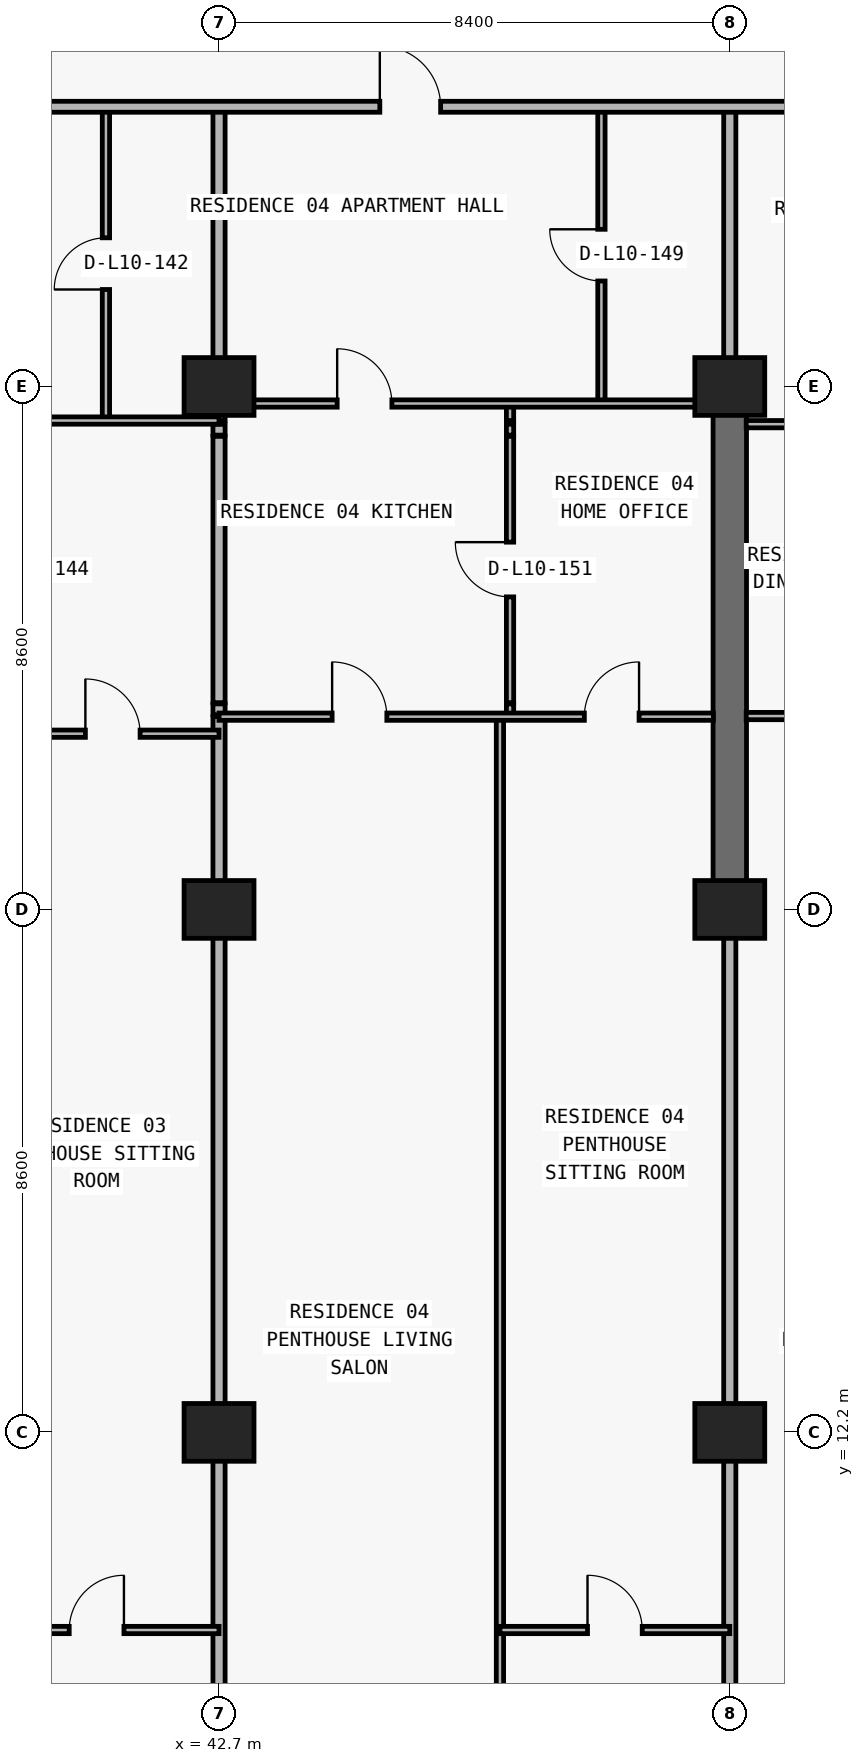
"""IFC4 building model, lengths in metres.
Left out: names, types, materials, properties, quantities, classifications, styles, units other than length and angle.
Written with IfcOpenShell. Run it as: python <this file> out.ifc"""

import sys

from ifc_helpers import new_model, si_unit, direction, frame, frame_2d, origin, origin_2d, place, context, subcontext, project, spatial, rectangle, extrude, element, fill, save


model = new_model("IFC4")
c1 = context("Model", 3, precision=1e-05, world=origin(), true_north=direction((0.0, 1.0)))
c2 = subcontext(c1, "Body", "Model", "MODEL_VIEW")
j1 = project(units=[si_unit("LENGTHUNIT", "METRE"), si_unit("PLANEANGLEUNIT", "RADIAN")], contexts=[c1])
p1 = place(None, origin())
s1 = spatial("IfcSite", under=j1, at=p1, CompositionType="ELEMENT")
p2 = place(p1, origin())
s2 = spatial("IfcBuilding", under=s1, at=p2, CompositionType="ELEMENT")
p3 = place(p2, frame((0.0, 0.0, 43.2)))
s3 = spatial("IfcBuildingStorey", under=s2, at=p3, CompositionType="ELEMENT", Elevation=43.2)
for number, where, z_axis, x_axis in (
    (1, (42.7, 12.2, 0.0), (0.0, 0.0, 1.0), (1.0, 0.0, 0.0)),
    (2, (51.1, 12.2, 0.0), (0.0, 0.0, 1.0), (1.0, 0.0, 0.0)),
    (3, (42.7, 20.8, 0.0), (0.0, 0.0, 1.0), (1.0, 0.0, 0.0)),
    (4, (51.1, 20.8, 0.0), (0.0, 0.0, 1.0), (1.0, 0.0, 0.0)),
    (5, (42.7, 29.4, 0.0), (0.0, 0.0, 1.0), (1.0, 0.0, 0.0)),
    (6, (51.1, 29.4, 0.0), (0.0, 0.0, 1.0), (1.0, 0.0, 0.0)),
):
    element("IfcColumn", number, at=place(p3, frame(where, z_axis=z_axis, x_axis=x_axis)), inside=s3, PredefinedType="COLUMN", context=c2, shape_type="SweptSolid", body=[
        extrude(rectangle(XDim=1.15, YDim=0.95, at=origin_2d()), origin(), (0.0, 0.0, 1.0), 3.05),
    ])
p4 = place(p3, frame((51.1, 20.8, 0.0), z_axis=(0.0, 0.0, 1.0), x_axis=(0.0, 1.0, 0.0)))
e7 = element("IfcWall", 7, at=p4, inside=s3, PredefinedType="SHEAR", context=c2, shape_type="SweptSolid", body=[
    extrude(rectangle(XDim=8.6, YDim=0.55, at=frame_2d((4.3, 0.0))), origin(), (0.0, 0.0, 1.0), 3.05),
])
p5 = place(p3, frame((40.84, 28.84, 0.0), z_axis=(0.0, 0.0, 1.0), x_axis=(0.0, 1.0, 0.0)))
e8 = element("IfcWall", 8, at=p5, inside=s3, PredefinedType="PARTITIONING", context=c2, shape_type="SweptSolid", body=[
    extrude(rectangle(XDim=5.16, YDim=0.12, at=frame_2d((2.58, 0.0))), origin(), (0.0, 0.0, 1.0), 3.05),
])
p6 = place(p5, frame((2.155, 0.0, 0.0)))
e9 = element("IfcOpeningElement", 9, at=p6, cuts=e8, PredefinedType="OPENING", context=c2, shape_type="SweptSolid", body=[
    extrude(rectangle(XDim=0.85, YDim=2.1, at=frame_2d((0.425, 1.05))), frame((0.0, 0.07, 0.0), z_axis=(0.0, -1.0, 0.0), x_axis=(1.0, 0.0, 0.0)), (0.0, 0.0, 1.0), 0.14),
])
p7 = place(p3, frame((42.7, 6.24, 0.0), z_axis=(0.0, 0.0, 1.0), x_axis=(0.0, 1.0, 0.0)))
e10 = element("IfcWall", 10, at=p7, inside=s3, PredefinedType="PARTITIONING", context=c2, shape_type="SweptSolid", body=[
    extrude(rectangle(XDim=17.73, YDim=0.2, at=frame_2d((8.865, 0.0))), origin(), (0.0, 0.0, 1.0), 2.11),
])
p8 = place(p3, frame((42.7, 24.0, 0.0), z_axis=(0.0, 0.0, 1.0), x_axis=(0.0, 1.0, 0.0)))
e11 = element("IfcWall", 11, at=p8, inside=s3, PredefinedType="PARTITIONING", context=c2, shape_type="SweptSolid", body=[
    extrude(rectangle(XDim=0.18, YDim=0.2, at=frame_2d((0.09, 0.0))), origin(), (0.0, 0.0, 1.0), 2.11),
])
p9 = place(p3, frame((42.7, 24.2, 0.0), z_axis=(0.0, 0.0, 1.0), x_axis=(0.0, 1.0, 0.0)))
e12 = element("IfcWall", 12, at=p9, inside=s3, PredefinedType="PARTITIONING", context=c2, shape_type="SweptSolid", body=[
    extrude(rectangle(XDim=4.38, YDim=0.2, at=frame_2d((2.19, 0.0))), origin(), (0.0, 0.0, 1.0), 2.11),
])
p10 = place(p3, frame((42.7, 28.6, 0.0), z_axis=(0.0, 0.0, 1.0), x_axis=(0.0, 1.0, 0.0)))
e13 = element("IfcWall", 13, at=p10, inside=s3, PredefinedType="PARTITIONING", context=c2, shape_type="SweptSolid", body=[
    extrude(rectangle(XDim=0.18, YDim=0.2, at=frame_2d((0.09, 0.0))), origin(), (0.0, 0.0, 1.0), 2.11),
])
p11 = place(p3, frame((42.7, 28.84, 0.0), z_axis=(0.0, 0.0, 1.0), x_axis=(0.0, 1.0, 0.0)))
e14 = element("IfcWall", 14, at=p11, inside=s3, PredefinedType="PARTITIONING", context=c2, shape_type="SweptSolid", body=[
    extrude(rectangle(XDim=5.16, YDim=0.2, at=frame_2d((2.58, 0.0))), origin(), (0.0, 0.0, 1.0), 2.11),
])
p12 = place(p3, frame((47.32, 6.24, 0.0), z_axis=(0.0, 0.0, 1.0), x_axis=(0.0, 1.0, 0.0)))
e15 = element("IfcWall", 15, at=p12, inside=s3, PredefinedType="PARTITIONING", context=c2, shape_type="SweptSolid", body=[
    extrude(rectangle(XDim=17.73, YDim=0.12, at=frame_2d((8.865, 0.0))), origin(), (0.0, 0.0, 1.0), 3.05),
])
p13 = place(p3, frame((47.486, 24.0, 0.0), z_axis=(0.0, 0.0, 1.0), x_axis=(0.0, 1.0, 0.0)))
e16 = element("IfcWall", 16, at=p13, inside=s3, PredefinedType="PARTITIONING", context=c2, shape_type="SweptSolid", body=[
    extrude(rectangle(XDim=0.18, YDim=0.12, at=frame_2d((0.09, 0.0))), origin(), (0.0, 0.0, 1.0), 3.05),
])
p14 = place(p3, frame((47.486, 24.2, 0.0), z_axis=(0.0, 0.0, 1.0), x_axis=(0.0, 1.0, 0.0)))
e17 = element("IfcWall", 17, at=p14, inside=s3, PredefinedType="PARTITIONING", context=c2, shape_type="SweptSolid", body=[
    extrude(rectangle(XDim=4.38, YDim=0.12, at=frame_2d((2.19, 0.0))), origin(), (0.0, 0.0, 1.0), 3.05),
])
p15 = place(p14, frame((1.74, 0.0, 0.0)))
e18 = element("IfcOpeningElement", 18, at=p15, cuts=e17, PredefinedType="OPENING", context=c2, shape_type="SweptSolid", body=[
    extrude(rectangle(XDim=0.9, YDim=2.15, at=frame_2d((0.45, 1.075))), frame((0.0, 0.07, 0.0), z_axis=(0.0, -1.0, 0.0), x_axis=(1.0, 0.0, 0.0)), (0.0, 0.0, 1.0), 0.14),
])
p16 = place(p3, frame((47.486, 28.6, 0.0), z_axis=(0.0, 0.0, 1.0), x_axis=(0.0, 1.0, 0.0)))
e19 = element("IfcWall", 19, at=p16, inside=s3, PredefinedType="PARTITIONING", context=c2, shape_type="SweptSolid", body=[
    extrude(rectangle(XDim=0.18, YDim=0.12, at=frame_2d((0.09, 0.0))), origin(), (0.0, 0.0, 1.0), 3.05),
])
p17 = place(p3, frame((47.486, 28.84, 0.0), z_axis=(0.0, 0.0, 1.0), x_axis=(0.0, 1.0, 0.0)))
e20 = element("IfcWall", 20, at=p17, inside=s3, PredefinedType="PARTITIONING", context=c2, shape_type="SweptSolid", body=[
    extrude(rectangle(XDim=0.28, YDim=0.12, at=frame_2d((0.14, 0.0))), origin(), (0.0, 0.0, 1.0), 3.05),
])
p18 = place(p3, frame((48.989, 29.12, 0.0), z_axis=(0.0, 0.0, 1.0), x_axis=(0.0, 1.0, 0.0)))
e21 = element("IfcWall", 21, at=p18, inside=s3, PredefinedType="PARTITIONING", context=c2, shape_type="SweptSolid", body=[
    extrude(rectangle(XDim=4.88, YDim=0.12, at=frame_2d((2.44, 0.0))), origin(), (0.0, 0.0, 1.0), 3.05),
])
p19 = place(p18, frame((2.015, 0.0, 0.0)))
e22 = element("IfcOpeningElement", 22, at=p19, cuts=e21, PredefinedType="OPENING", context=c2, shape_type="SweptSolid", body=[
    extrude(rectangle(XDim=0.85, YDim=2.1, at=frame_2d((0.425, 1.05))), frame((0.0, 0.07, 0.0), z_axis=(0.0, -1.0, 0.0), x_axis=(1.0, 0.0, 0.0)), (0.0, 0.0, 1.0), 0.14),
])
p20 = place(p3, frame((51.1, 6.24, 0.0), z_axis=(0.0, 0.0, 1.0), x_axis=(0.0, 1.0, 0.0)))
e23 = element("IfcWall", 23, at=p20, inside=s3, PredefinedType="PARTITIONING", context=c2, shape_type="SweptSolid", body=[
    extrude(rectangle(XDim=14.555, YDim=0.2, at=frame_2d((7.277, 0.0))), origin(), (0.0, 0.0, 1.0), 2.11),
])
p21 = place(p3, frame((51.1, 29.405, 0.0), z_axis=(0.0, 0.0, 1.0), x_axis=(0.0, 1.0, 0.0)))
e24 = element("IfcWall", 24, at=p21, inside=s3, PredefinedType="PARTITIONING", context=c2, shape_type="SweptSolid", body=[
    extrude(rectangle(XDim=4.595, YDim=0.2, at=frame_2d((2.297, 0.0))), origin(), (0.0, 0.0, 1.0), 2.335),
])
p22 = place(p3, frame((38.672, 8.95, 0.0), z_axis=(0.0, 0.0, 1.0), x_axis=(1.0, 0.0, 0.0)))
e25 = element("IfcWall", 25, at=p22, inside=s3, PredefinedType="PARTITIONING", context=c2, shape_type="SweptSolid", body=[
    extrude(rectangle(XDim=4.028, YDim=0.12, at=frame_2d((2.014, 0.0))), origin(), (0.0, 0.0, 1.0), 3.05),
])
p23 = place(p22, frame((1.564, 0.0, 0.0)))
e26 = element("IfcOpeningElement", 26, at=p23, cuts=e25, PredefinedType="OPENING", context=c2, shape_type="SweptSolid", body=[
    extrude(rectangle(XDim=0.9, YDim=2.15, at=frame_2d((0.45, 1.075))), frame((0.0, 0.07, 0.0), z_axis=(0.0, -1.0, 0.0), x_axis=(1.0, 0.0, 0.0)), (0.0, 0.0, 1.0), 0.14),
])
p24 = place(p3, frame((47.32, 8.95, 0.0), z_axis=(0.0, 0.0, 1.0), x_axis=(1.0, 0.0, 0.0)))
e27 = element("IfcWall", 27, at=p24, inside=s3, PredefinedType="PARTITIONING", context=c2, shape_type="SweptSolid", body=[
    extrude(rectangle(XDim=3.78, YDim=0.12, at=frame_2d((1.89, 0.0))), origin(), (0.0, 0.0, 1.0), 3.05),
])
p25 = place(p24, frame((1.44, 0.0, 0.0)))
e28 = element("IfcOpeningElement", 28, at=p25, cuts=e27, PredefinedType="OPENING", context=c2, shape_type="SweptSolid", body=[
    extrude(rectangle(XDim=0.9, YDim=2.15, at=frame_2d((0.45, 1.075))), frame((0.0, 0.07, 0.0), z_axis=(0.0, -1.0, 0.0), x_axis=(1.0, 0.0, 0.0)), (0.0, 0.0, 1.0), 0.14),
])
p26 = place(p3, frame((35.1, 23.69, 0.0), z_axis=(0.0, 0.0, 1.0), x_axis=(1.0, 0.0, 0.0)))
e29 = element("IfcWall", 29, at=p26, inside=s3, PredefinedType="PARTITIONING", context=c2, shape_type="SweptSolid", body=[
    extrude(rectangle(XDim=7.6, YDim=0.12, at=frame_2d((3.8, 0.0))), origin(), (0.0, 0.0, 1.0), 3.05),
])
p27 = place(p26, frame((1.336, 0.0, 0.0)))
e30 = element("IfcOpeningElement", 30, at=p27, cuts=e29, PredefinedType="OPENING", context=c2, shape_type="SweptSolid", body=[
    extrude(rectangle(XDim=0.9, YDim=2.15, at=frame_2d((0.45, 1.075))), frame((0.0, 0.07, 0.0), z_axis=(0.0, -1.0, 0.0), x_axis=(1.0, 0.0, 0.0)), (0.0, 0.0, 1.0), 0.14),
])
p28 = place(p26, frame((5.402, 0.0, 0.0)))
e31 = element("IfcOpeningElement", 31, at=p28, cuts=e29, PredefinedType="OPENING", context=c2, shape_type="SweptSolid", body=[
    extrude(rectangle(XDim=0.9, YDim=2.15, at=frame_2d((0.45, 1.075))), frame((0.0, 0.07, 0.0), z_axis=(0.0, -1.0, 0.0), x_axis=(1.0, 0.0, 0.0)), (0.0, 0.0, 1.0), 0.14),
])
p29 = place(p3, frame((42.7, 23.97, 0.0), z_axis=(0.0, 0.0, 1.0), x_axis=(1.0, 0.0, 0.0)))
e32 = element("IfcWall", 32, at=p29, inside=s3, PredefinedType="PARTITIONING", context=c2, shape_type="SweptSolid", body=[
    extrude(rectangle(XDim=8.13, YDim=0.12, at=frame_2d((4.065, 0.0))), origin(), (0.0, 0.0, 1.0), 3.05),
])
p30 = place(p29, frame((1.86, 0.0, 0.0)))
e33 = element("IfcOpeningElement", 33, at=p30, cuts=e32, PredefinedType="OPENING", context=c2, shape_type="SweptSolid", body=[
    extrude(rectangle(XDim=0.9, YDim=2.15, at=frame_2d((0.45, 1.075))), frame((0.0, 0.07, 0.0), z_axis=(0.0, -1.0, 0.0), x_axis=(1.0, 0.0, 0.0)), (0.0, 0.0, 1.0), 0.14),
])
p31 = place(p29, frame((6.008, 0.0, 0.0)))
e34 = element("IfcOpeningElement", 34, at=p31, cuts=e32, PredefinedType="OPENING", context=c2, shape_type="SweptSolid", body=[
    extrude(rectangle(XDim=0.9, YDim=2.15, at=frame_2d((0.45, 1.075))), frame((0.0, 0.07, 0.0), z_axis=(0.0, -1.0, 0.0), x_axis=(1.0, 0.0, 0.0)), (0.0, 0.0, 1.0), 0.14),
])
p32 = place(p3, frame((51.37, 23.98, 0.0), z_axis=(0.0, 0.0, 1.0), x_axis=(1.0, 0.0, 0.0)))
e35 = element("IfcWall", 35, at=p32, inside=s3, PredefinedType="PARTITIONING", context=c2, shape_type="SweptSolid", body=[
    extrude(rectangle(XDim=8.13, YDim=0.12, at=frame_2d((4.065, 0.0))), origin(), (0.0, 0.0, 1.0), 3.05),
])
p33 = place(p32, frame((1.305, 0.0, 0.0)))
e36 = element("IfcOpeningElement", 36, at=p33, cuts=e35, PredefinedType="OPENING", context=c2, shape_type="SweptSolid", body=[
    extrude(rectangle(XDim=0.9, YDim=2.15, at=frame_2d((0.45, 1.075))), frame((0.0, 0.07, 0.0), z_axis=(0.0, -1.0, 0.0), x_axis=(1.0, 0.0, 0.0)), (0.0, 0.0, 1.0), 0.14),
])
p34 = place(p3, frame((51.37, 28.78, 0.0), z_axis=(0.0, 0.0, 1.0), x_axis=(1.0, 0.0, 0.0)))
e37 = element("IfcWall", 37, at=p34, inside=s3, PredefinedType="PARTITIONING", context=c2, shape_type="SweptSolid", body=[
    extrude(rectangle(XDim=8.13, YDim=0.12, at=frame_2d((4.065, 0.0))), origin(), (0.0, 0.0, 1.0), 3.05),
])
p35 = place(p34, frame((1.305, 0.0, 0.0)))
e38 = element("IfcOpeningElement", 38, at=p35, cuts=e37, PredefinedType="OPENING", context=c2, shape_type="SweptSolid", body=[
    extrude(rectangle(XDim=0.9, YDim=2.15, at=frame_2d((0.45, 1.075))), frame((0.0, 0.07, 0.0), z_axis=(0.0, -1.0, 0.0), x_axis=(1.0, 0.0, 0.0)), (0.0, 0.0, 1.0), 0.14),
])
p36 = place(p3, frame((35.1, 28.84, 0.0), z_axis=(0.0, 0.0, 1.0), x_axis=(1.0, 0.0, 0.0)))
e39 = element("IfcWall", 39, at=p36, inside=s3, PredefinedType="PARTITIONING", context=c2, shape_type="SweptSolid", body=[
    extrude(rectangle(XDim=7.6, YDim=0.12, at=frame_2d((3.8, 0.0))), origin(), (0.0, 0.0, 1.0), 3.05),
])
p37 = place(p36, frame((1.602, 0.0, 0.0)))
e40 = element("IfcOpeningElement", 40, at=p37, cuts=e39, PredefinedType="OPENING", context=c2, shape_type="SweptSolid", body=[
    extrude(rectangle(XDim=0.9, YDim=2.15, at=frame_2d((0.45, 1.075))), frame((0.0, 0.07, 0.0), z_axis=(0.0, -1.0, 0.0), x_axis=(1.0, 0.0, 0.0)), (0.0, 0.0, 1.0), 0.14),
])
p38 = place(p3, frame((42.7, 29.12, 0.0), z_axis=(0.0, 0.0, 1.0), x_axis=(1.0, 0.0, 0.0)))
e41 = element("IfcWall", 41, at=p38, inside=s3, PredefinedType="PARTITIONING", context=c2, shape_type="SweptSolid", body=[
    extrude(rectangle(XDim=8.13, YDim=0.12, at=frame_2d((4.065, 0.0))), origin(), (0.0, 0.0, 1.0), 2.11),
])
p39 = place(p38, frame((1.943, 0.0, 0.0)))
e42 = element("IfcOpeningElement", 42, at=p39, cuts=e41, PredefinedType="OPENING", context=c2, shape_type="SweptSolid", body=[
    extrude(rectangle(XDim=0.9, YDim=2.06, at=frame_2d((0.45, 1.03))), frame((0.0, 0.07, 0.0), z_axis=(0.0, -1.0, 0.0), x_axis=(1.0, 0.0, 0.0)), (0.0, 0.0, 1.0), 0.14),
])
p40 = place(p3, frame((31.4, 34.0, 0.0), z_axis=(0.0, 0.0, 1.0), x_axis=(1.0, 0.0, 0.0)))
e43 = element("IfcWall", 43, at=p40, inside=s3, PredefinedType="PARTITIONING", context=c2, shape_type="SweptSolid", body=[
    extrude(rectangle(XDim=41.3, YDim=0.18, at=frame_2d((20.65, 0.0))), origin(), (0.0, 0.0, 1.0), 3.05),
])
p41 = place(p40, frame((6.07, 0.0, 0.0)))
e44 = element("IfcOpeningElement", 44, at=p41, cuts=e43, PredefinedType="OPENING", context=c2, shape_type="SweptSolid", body=[
    extrude(rectangle(XDim=1.0, YDim=2.2, at=frame_2d((0.5, 1.1))), frame((0.0, 0.1, 0.0), z_axis=(0.0, -1.0, 0.0), x_axis=(1.0, 0.0, 0.0)), (0.0, 0.0, 1.0), 0.2),
])
p42 = place(p40, frame((13.945, 0.0, 0.0)))
e45 = element("IfcOpeningElement", 45, at=p42, cuts=e43, PredefinedType="OPENING", context=c2, shape_type="SweptSolid", body=[
    extrude(rectangle(XDim=1.0, YDim=2.2, at=frame_2d((0.5, 1.1))), frame((0.0, 0.1, 0.0), z_axis=(0.0, -1.0, 0.0), x_axis=(1.0, 0.0, 0.0)), (0.0, 0.0, 1.0), 0.2),
])
p43 = place(p40, frame((22.414, 0.0, 0.0)))
e46 = element("IfcOpeningElement", 46, at=p43, cuts=e43, PredefinedType="OPENING", context=c2, shape_type="SweptSolid", body=[
    extrude(rectangle(XDim=1.0, YDim=2.2, at=frame_2d((0.5, 1.1))), frame((0.0, 0.1, 0.0), z_axis=(0.0, -1.0, 0.0), x_axis=(1.0, 0.0, 0.0)), (0.0, 0.0, 1.0), 0.2),
])
p44 = place(p6, origin())
e47 = element("IfcDoor", 47, at=p44, inside=s3, OperationType="SINGLE_SWING_LEFT", PredefinedType="DOOR", context=c2, shape_type="SweptSolid", body=[
    extrude(rectangle(XDim=0.85, YDim=2.1, at=frame_2d((0.425, 1.05))), frame((0.0, 0.025, 0.0), z_axis=(0.0, -1.0, 0.0), x_axis=(1.0, 0.0, 0.0)), (0.0, 0.0, 1.0), 0.05),
])
fill(e9, e47)
p45 = place(p28, origin())
e48 = element("IfcDoor", 48, at=p45, inside=s3, OperationType="SINGLE_SWING_LEFT", PredefinedType="DOOR", context=c2, shape_type="SweptSolid", body=[
    extrude(rectangle(XDim=0.9, YDim=2.15, at=frame_2d((0.45, 1.075))), frame((0.0, 0.025, 0.0), z_axis=(0.0, -1.0, 0.0), x_axis=(1.0, 0.0, 0.0)), (0.0, 0.0, 1.0), 0.05),
])
fill(e31, e48)
p46 = place(p23, origin())
e49 = element("IfcDoor", 49, at=p46, inside=s3, OperationType="SINGLE_SWING_RIGHT", PredefinedType="DOOR", context=c2, shape_type="SweptSolid", body=[
    extrude(rectangle(XDim=0.9, YDim=2.15, at=frame_2d((0.45, 1.075))), frame((0.0, 0.025, 0.0), z_axis=(0.0, -1.0, 0.0), x_axis=(1.0, 0.0, 0.0)), (0.0, 0.0, 1.0), 0.05),
])
fill(e26, e49)
p47 = place(p42, origin())
e50 = element("IfcDoor", 50, at=p47, inside=s3, OperationType="SINGLE_SWING_LEFT", PredefinedType="DOOR", context=c2, shape_type="SweptSolid", body=[
    extrude(rectangle(XDim=1.0, YDim=2.2, at=frame_2d((0.5, 1.1))), frame((0.0, 0.025, 0.0), z_axis=(0.0, -1.0, 0.0), x_axis=(1.0, 0.0, 0.0)), (0.0, 0.0, 1.0), 0.05),
])
fill(e45, e50)
p48 = place(p19, origin())
e51 = element("IfcDoor", 51, at=p48, inside=s3, OperationType="SINGLE_SWING_RIGHT", PredefinedType="DOOR", context=c2, shape_type="SweptSolid", body=[
    extrude(rectangle(XDim=0.85, YDim=2.1, at=frame_2d((0.425, 1.05))), frame((0.0, 0.025, 0.0), z_axis=(0.0, -1.0, 0.0), x_axis=(1.0, 0.0, 0.0)), (0.0, 0.0, 1.0), 0.05),
])
fill(e22, e51)
p49 = place(p39, origin())
e52 = element("IfcDoor", 52, at=p49, inside=s3, OperationType="SINGLE_SWING_LEFT", PredefinedType="DOOR", context=c2, shape_type="SweptSolid", body=[
    extrude(rectangle(XDim=0.9, YDim=2.06, at=frame_2d((0.45, 1.03))), frame((0.0, 0.025, 0.0), z_axis=(0.0, -1.0, 0.0), x_axis=(1.0, 0.0, 0.0)), (0.0, 0.0, 1.0), 0.05),
])
fill(e42, e52)
p50 = place(p15, origin())
e53 = element("IfcDoor", 53, at=p50, inside=s3, OperationType="SINGLE_SWING_RIGHT", PredefinedType="DOOR", context=c2, shape_type="SweptSolid", body=[
    extrude(rectangle(XDim=0.9, YDim=2.15, at=frame_2d((0.45, 1.075))), frame((0.0, 0.025, 0.0), z_axis=(0.0, -1.0, 0.0), x_axis=(1.0, 0.0, 0.0)), (0.0, 0.0, 1.0), 0.05),
])
fill(e18, e53)
p51 = place(p30, origin())
e54 = element("IfcDoor", 54, at=p51, inside=s3, OperationType="SINGLE_SWING_LEFT", PredefinedType="DOOR", context=c2, shape_type="SweptSolid", body=[
    extrude(rectangle(XDim=0.9, YDim=2.15, at=frame_2d((0.45, 1.075))), frame((0.0, 0.025, 0.0), z_axis=(0.0, -1.0, 0.0), x_axis=(1.0, 0.0, 0.0)), (0.0, 0.0, 1.0), 0.05),
])
fill(e33, e54)
p52 = place(p31, origin())
e55 = element("IfcDoor", 55, at=p52, inside=s3, OperationType="SINGLE_SWING_RIGHT", PredefinedType="DOOR", context=c2, shape_type="SweptSolid", body=[
    extrude(rectangle(XDim=0.9, YDim=2.15, at=frame_2d((0.45, 1.075))), frame((0.0, 0.025, 0.0), z_axis=(0.0, -1.0, 0.0), x_axis=(1.0, 0.0, 0.0)), (0.0, 0.0, 1.0), 0.05),
])
fill(e34, e55)
p53 = place(p25, origin())
e56 = element("IfcDoor", 56, at=p53, inside=s3, OperationType="SINGLE_SWING_LEFT", PredefinedType="DOOR", context=c2, shape_type="SweptSolid", body=[
    extrude(rectangle(XDim=0.9, YDim=2.15, at=frame_2d((0.45, 1.075))), frame((0.0, 0.025, 0.0), z_axis=(0.0, -1.0, 0.0), x_axis=(1.0, 0.0, 0.0)), (0.0, 0.0, 1.0), 0.05),
])
fill(e28, e56)
save(model, sys.argv[1])
